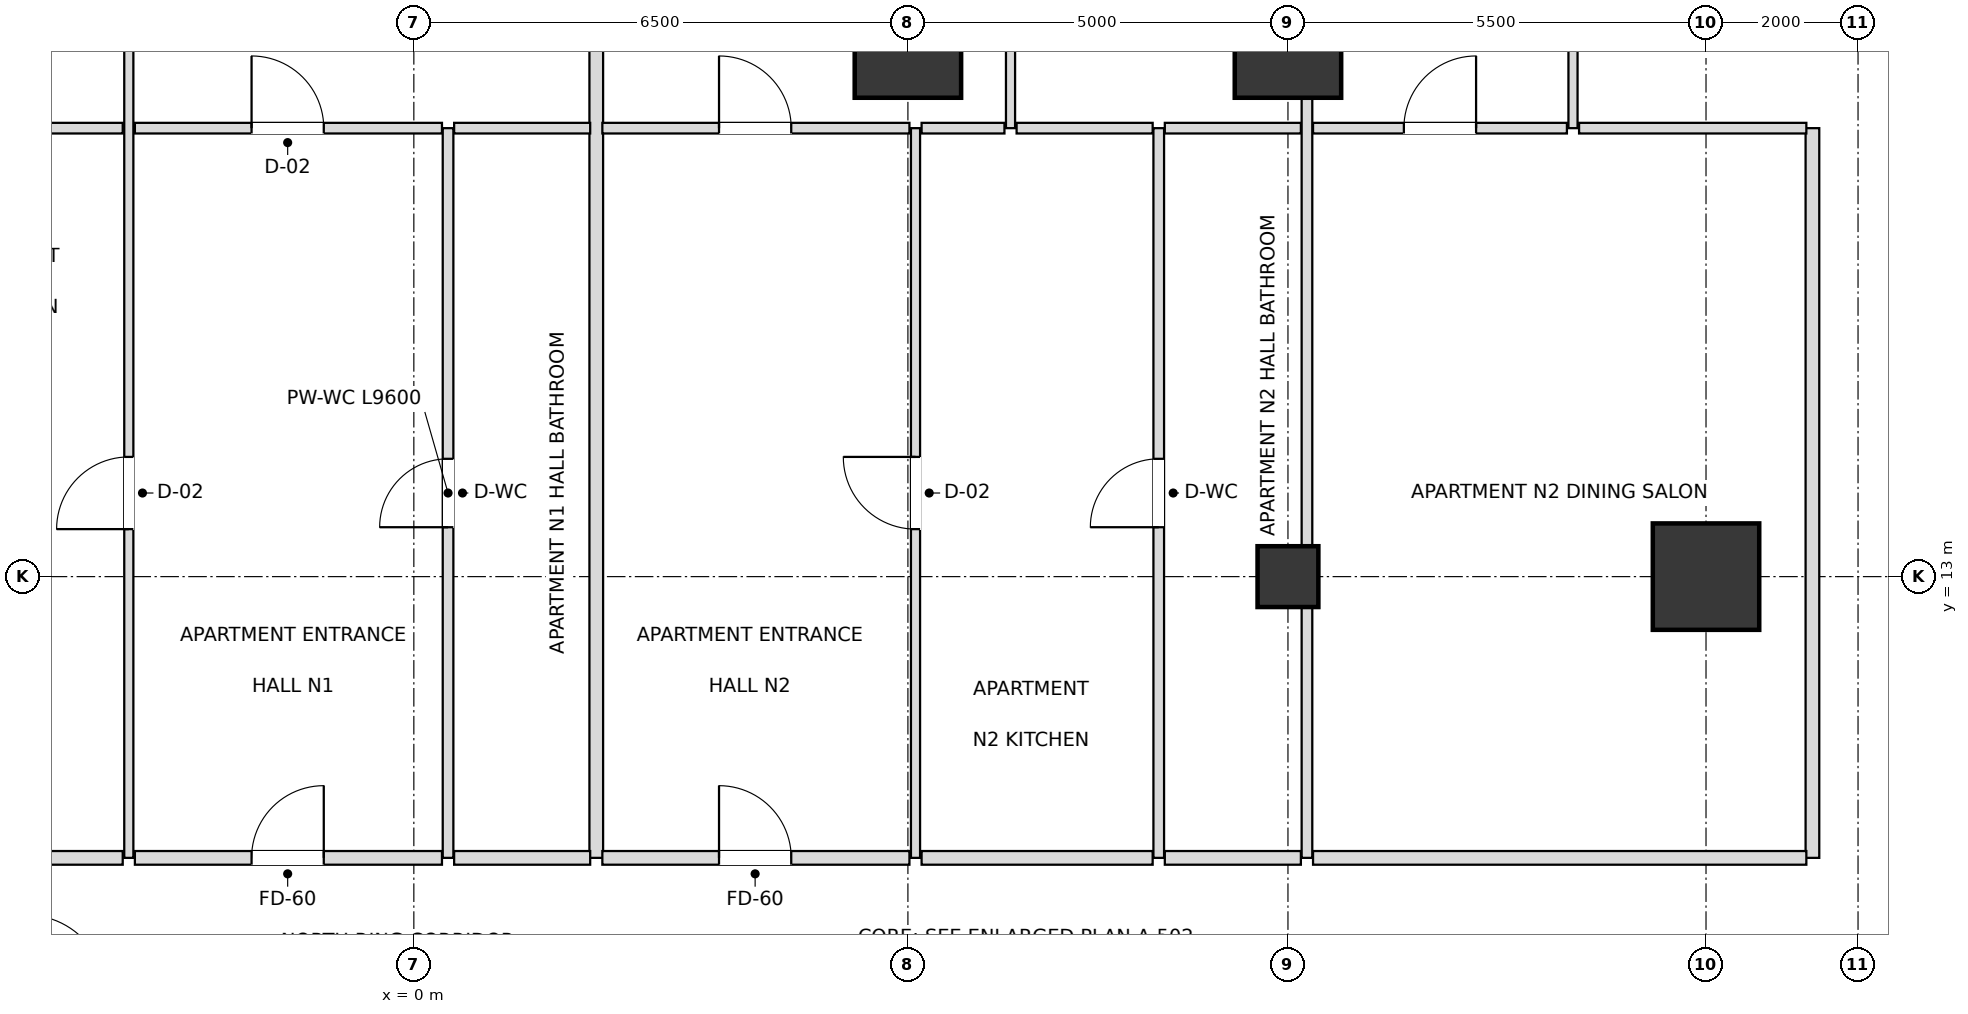
"""IFC4 building model, lengths in metres.
Left out: names, types, materials, properties, quantities, classifications, styles, units other than length and angle.
Written with IfcOpenShell. Run it as: python <this file> out.ifc"""

import sys

from ifc_helpers import new_model, si_unit, direction, frame, frame_2d, origin, origin_2d, place, context, subcontext, project, spatial, rectangle, extrude, element, fill, save


model = new_model("IFC4")
c1 = context("Model", 3, precision=1e-05, world=origin(), true_north=direction((0.0, 1.0)))
c2 = subcontext(c1, "Body", "Model", "MODEL_VIEW")
j1 = project(units=[si_unit("LENGTHUNIT", "METRE"), si_unit("PLANEANGLEUNIT", "RADIAN")], contexts=[c1])
p1 = place(None, origin())
s1 = spatial("IfcSite", under=j1, at=p1, CompositionType="ELEMENT")
p2 = place(p1, origin())
s2 = spatial("IfcBuilding", under=s1, at=p2, CompositionType="ELEMENT")
p3 = place(p2, frame((0.0, 0.0, 57.6)))
s3 = spatial("IfcBuildingStorey", under=s2, at=p3, CompositionType="ELEMENT", Elevation=57.6)
for number, where, z_axis, x_axis in (
    (1, (17.0, 13.0, 0.0), (0.0, 0.0, 1.0), (1.0, 0.0, 0.0)),
    (2, (11.5, 20.0, 0.0), (0.0, 0.0, 1.0), (1.0, 0.0, 0.0)),
    (3, (6.5, 20.0, 0.0), (0.0, 0.0, 1.0), (1.0, 0.0, 0.0)),
):
    element("IfcColumn", number, at=place(p3, frame(where, z_axis=z_axis, x_axis=x_axis)), inside=s3, PredefinedType="USERDEFINED", context=c2, shape_type="SweptSolid", body=[
        extrude(rectangle(XDim=1.4, YDim=1.4, at=origin_2d()), origin(), (0.0, 0.0, 1.0), 3.6),
    ])
p4 = place(p3, frame((11.5, 13.0, 0.0), z_axis=(0.0, 0.0, 1.0), x_axis=(1.0, 0.0, 0.0)))
e4 = element("IfcColumn", 4, at=p4, inside=s3, PredefinedType="COLUMN", context=c2, shape_type="SweptSolid", body=[
    extrude(rectangle(XDim=0.8, YDim=0.8, at=origin_2d()), origin(), (0.0, 0.0, 1.0), 3.6),
])
p5 = place(p3, frame((-3.75, 9.3, 0.0), z_axis=(0.0, 0.0, 1.0), x_axis=(0.0, 1.0, 0.0)))
e5 = element("IfcWall", 5, at=p5, inside=s3, PredefinedType="PARTITIONING", context=c2, shape_type="SweptSolid", body=[
    extrude(rectangle(XDim=15.6, YDim=0.12, at=frame_2d((7.8, 0.0))), origin(), (0.0, 0.0, 1.0), 2.816),
])
p6 = place(p5, frame((4.325, 0.0, 0.0)))
e6 = element("IfcOpeningElement", 6, at=p6, cuts=e5, PredefinedType="OPENING", context=c2, shape_type="SweptSolid", body=[
    extrude(rectangle(XDim=0.95, YDim=2.1, at=frame_2d((0.475, 1.05))), frame((0.0, 0.07, 0.0), z_axis=(0.0, -1.0, 0.0), x_axis=(1.0, 0.0, 0.0)), (0.0, 0.0, 1.0), 0.14),
])
p7 = place(p5, frame((12.15, 0.0, 0.0)))
e7 = element("IfcOpeningElement", 7, at=p7, cuts=e5, PredefinedType="OPENING", context=c2, shape_type="SweptSolid", body=[
    extrude(rectangle(XDim=0.9, YDim=2.1, at=frame_2d((0.45, 1.05))), frame((0.0, 0.07, 0.0), z_axis=(0.0, -1.0, 0.0), x_axis=(1.0, 0.0, 0.0)), (0.0, 0.0, 1.0), 0.14),
])
p8 = place(p3, frame((0.45, 9.3, 0.0), z_axis=(0.0, 0.0, 1.0), x_axis=(0.0, 1.0, 0.0)))
e8 = element("IfcWall", 8, at=p8, inside=s3, PredefinedType="PARTITIONING", context=c2, shape_type="SweptSolid", body=[
    extrude(rectangle(XDim=9.6, YDim=0.14, at=frame_2d((4.8, 0.0))), origin(), (0.0, 0.0, 1.0), 2.948),
])
p9 = place(p8, frame((4.35, 0.0, 0.0)))
e9 = element("IfcOpeningElement", 9, at=p9, cuts=e8, PredefinedType="OPENING", context=c2, shape_type="SweptSolid", body=[
    extrude(rectangle(XDim=0.9, YDim=2.1, at=frame_2d((0.45, 1.05))), frame((0.0, 0.08, 0.0), z_axis=(0.0, -1.0, 0.0), x_axis=(1.0, 0.0, 0.0)), (0.0, 0.0, 1.0), 0.16),
])
p10 = place(p3, frame((2.4, 9.3, 0.0), z_axis=(0.0, 0.0, 1.0), x_axis=(0.0, 1.0, 0.0)))
e10 = element("IfcWall", 10, at=p10, inside=s3, PredefinedType="PARTITIONING", context=c2, shape_type="SweptSolid", body=[
    extrude(rectangle(XDim=15.6, YDim=0.18, at=frame_2d((7.8, 0.0))), origin(), (0.0, 0.0, 1.0), 2.816),
])
p11 = place(p3, frame((6.6, 9.3, 0.0), z_axis=(0.0, 0.0, 1.0), x_axis=(0.0, 1.0, 0.0)))
e11 = element("IfcWall", 11, at=p11, inside=s3, PredefinedType="PARTITIONING", context=c2, shape_type="SweptSolid", body=[
    extrude(rectangle(XDim=9.6, YDim=0.12, at=frame_2d((4.8, 0.0))), origin(), (0.0, 0.0, 1.0), 2.816),
])
p12 = place(p11, frame((4.325, 0.0, 0.0)))
e12 = element("IfcOpeningElement", 12, at=p12, cuts=e11, PredefinedType="OPENING", context=c2, shape_type="SweptSolid", body=[
    extrude(rectangle(XDim=0.95, YDim=2.1, at=frame_2d((0.475, 1.05))), frame((0.0, 0.07, 0.0), z_axis=(0.0, -1.0, 0.0), x_axis=(1.0, 0.0, 0.0)), (0.0, 0.0, 1.0), 0.14),
])
p13 = place(p3, frame((7.85, 18.9, 0.0), z_axis=(0.0, 0.0, 1.0), x_axis=(0.0, 1.0, 0.0)))
e13 = element("IfcWall", 13, at=p13, inside=s3, PredefinedType="PARTITIONING", context=c2, shape_type="SweptSolid", body=[
    extrude(rectangle(XDim=6.0, YDim=0.12, at=frame_2d((3.0, 0.0))), origin(), (0.0, 0.0, 1.0), 2.816),
])
p14 = place(p13, frame((2.55, 0.0, 0.0)))
e14 = element("IfcOpeningElement", 14, at=p14, cuts=e13, PredefinedType="OPENING", context=c2, shape_type="SweptSolid", body=[
    extrude(rectangle(XDim=0.9, YDim=2.1, at=frame_2d((0.45, 1.05))), frame((0.0, 0.07, 0.0), z_axis=(0.0, -1.0, 0.0), x_axis=(1.0, 0.0, 0.0)), (0.0, 0.0, 1.0), 0.14),
])
p15 = place(p3, frame((9.8, 9.3, 0.0), z_axis=(0.0, 0.0, 1.0), x_axis=(0.0, 1.0, 0.0)))
e15 = element("IfcWall", 15, at=p15, inside=s3, PredefinedType="PARTITIONING", context=c2, shape_type="SweptSolid", body=[
    extrude(rectangle(XDim=9.6, YDim=0.14, at=frame_2d((4.8, 0.0))), origin(), (0.0, 0.0, 1.0), 2.816),
])
p16 = place(p15, frame((4.35, 0.0, 0.0)))
e16 = element("IfcOpeningElement", 16, at=p16, cuts=e15, PredefinedType="OPENING", context=c2, shape_type="SweptSolid", body=[
    extrude(rectangle(XDim=0.9, YDim=2.1, at=frame_2d((0.45, 1.05))), frame((0.0, 0.08, 0.0), z_axis=(0.0, -1.0, 0.0), x_axis=(1.0, 0.0, 0.0)), (0.0, 0.0, 1.0), 0.16),
])
p17 = place(p3, frame((11.75, 9.3, 0.0), z_axis=(0.0, 0.0, 1.0), x_axis=(0.0, 1.0, 0.0)))
e17 = element("IfcWall", 17, at=p17, inside=s3, PredefinedType="PARTITIONING", context=c2, shape_type="SweptSolid", body=[
    extrude(rectangle(XDim=15.6, YDim=0.14, at=frame_2d((7.8, 0.0))), origin(), (0.0, 0.0, 1.0), 2.736),
])
p18 = place(p17, frame((12.15, 0.0, 0.0)))
e18 = element("IfcOpeningElement", 18, at=p18, cuts=e17, PredefinedType="OPENING", context=c2, shape_type="SweptSolid", body=[
    extrude(rectangle(XDim=0.9, YDim=2.1, at=frame_2d((0.45, 1.05))), frame((0.0, 0.08, 0.0), z_axis=(0.0, -1.0, 0.0), x_axis=(1.0, 0.0, 0.0)), (0.0, 0.0, 1.0), 0.16),
])
p19 = place(p3, frame((15.25, 18.9, 0.0), z_axis=(0.0, 0.0, 1.0), x_axis=(0.0, 1.0, 0.0)))
e19 = element("IfcWall", 19, at=p19, inside=s3, PredefinedType="PARTITIONING", context=c2, shape_type="SweptSolid", body=[
    extrude(rectangle(XDim=6.0, YDim=0.12, at=frame_2d((3.0, 0.0))), origin(), (0.0, 0.0, 1.0), 2.736),
])
p20 = place(p19, frame((2.55, 0.0, 0.0)))
e20 = element("IfcOpeningElement", 20, at=p20, cuts=e19, PredefinedType="OPENING", context=c2, shape_type="SweptSolid", body=[
    extrude(rectangle(XDim=0.9, YDim=2.1, at=frame_2d((0.45, 1.05))), frame((0.0, 0.07, 0.0), z_axis=(0.0, -1.0, 0.0), x_axis=(1.0, 0.0, 0.0)), (0.0, 0.0, 1.0), 0.14),
])
p21 = place(p3, frame((18.4, 9.3, 0.0), z_axis=(0.0, 0.0, 1.0), x_axis=(0.0, 1.0, 0.0)))
e21 = element("IfcWall", 21, at=p21, inside=s3, PredefinedType="PARTITIONING", context=c2, shape_type="SweptSolid", body=[
    extrude(rectangle(XDim=9.6, YDim=0.18, at=frame_2d((4.8, 0.0))), origin(), (0.0, 0.0, 1.0), 2.736),
])
p22 = place(p3, frame((-6.87, 9.3, 0.0), z_axis=(0.0, 0.0, 1.0), x_axis=(1.0, 0.0, 0.0)))
e22 = element("IfcWall", 22, at=p22, inside=s3, PredefinedType="PARTITIONING", context=c2, shape_type="SweptSolid", body=[
    extrude(rectangle(XDim=3.04, YDim=0.18, at=frame_2d((1.52, 0.0))), origin(), (0.0, 0.0, 1.0), 2.816),
])
p23 = place(p3, frame((-3.67, 9.3, 0.0), z_axis=(0.0, 0.0, 1.0), x_axis=(1.0, 0.0, 0.0)))
e23 = element("IfcWall", 23, at=p23, inside=s3, PredefinedType="PARTITIONING", context=c2, shape_type="SweptSolid", body=[
    extrude(rectangle(XDim=4.04, YDim=0.18, at=frame_2d((2.02, 0.0))), origin(), (0.0, 0.0, 1.0), 3.38),
])
p24 = place(p23, frame((1.535, 0.0, 0.0)))
e24 = element("IfcOpeningElement", 24, at=p24, cuts=e23, PredefinedType="OPENING", context=c2, shape_type="SweptSolid", body=[
    extrude(rectangle(XDim=0.95, YDim=2.15, at=frame_2d((0.475, 1.075))), frame((0.0, 0.1, 0.0), z_axis=(0.0, -1.0, 0.0), x_axis=(1.0, 0.0, 0.0)), (0.0, 0.0, 1.0), 0.2),
])
p25 = place(p3, frame((0.53, 9.3, 0.0), z_axis=(0.0, 0.0, 1.0), x_axis=(1.0, 0.0, 0.0)))
e25 = element("IfcWall", 25, at=p25, inside=s3, PredefinedType="PARTITIONING", context=c2, shape_type="SweptSolid", body=[
    extrude(rectangle(XDim=1.79, YDim=0.18, at=frame_2d((0.895, 0.0))), origin(), (0.0, 0.0, 1.0), 3.38),
])
p26 = place(p3, frame((2.48, 9.3, 0.0), z_axis=(0.0, 0.0, 1.0), x_axis=(1.0, 0.0, 0.0)))
e26 = element("IfcWall", 26, at=p26, inside=s3, PredefinedType="PARTITIONING", context=c2, shape_type="SweptSolid", body=[
    extrude(rectangle(XDim=4.04, YDim=0.18, at=frame_2d((2.02, 0.0))), origin(), (0.0, 0.0, 1.0), 3.38),
])
p27 = place(p26, frame((1.535, 0.0, 0.0)))
e27 = element("IfcOpeningElement", 27, at=p27, cuts=e26, PredefinedType="OPENING", context=c2, shape_type="SweptSolid", body=[
    extrude(rectangle(XDim=0.95, YDim=2.15, at=frame_2d((0.475, 1.075))), frame((0.0, 0.1, 0.0), z_axis=(0.0, -1.0, 0.0), x_axis=(1.0, 0.0, 0.0)), (0.0, 0.0, 1.0), 0.2),
])
p28 = place(p3, frame((6.68, 9.3, 0.0), z_axis=(0.0, 0.0, 1.0), x_axis=(1.0, 0.0, 0.0)))
e28 = element("IfcWall", 28, at=p28, inside=s3, PredefinedType="PARTITIONING", context=c2, shape_type="SweptSolid", body=[
    extrude(rectangle(XDim=3.04, YDim=0.18, at=frame_2d((1.52, 0.0))), origin(), (0.0, 0.0, 1.0), 3.38),
])
p29 = place(p3, frame((9.88, 9.3, 0.0), z_axis=(0.0, 0.0, 1.0), x_axis=(1.0, 0.0, 0.0)))
e29 = element("IfcWall", 29, at=p29, inside=s3, PredefinedType="PARTITIONING", context=c2, shape_type="SweptSolid", body=[
    extrude(rectangle(XDim=1.79, YDim=0.18, at=frame_2d((0.895, 0.0))), origin(), (0.0, 0.0, 1.0), 3.38),
])
p30 = place(p3, frame((11.83, 9.3, 0.0), z_axis=(0.0, 0.0, 1.0), x_axis=(1.0, 0.0, 0.0)))
e30 = element("IfcWall", 30, at=p30, inside=s3, PredefinedType="PARTITIONING", context=c2, shape_type="SweptSolid", body=[
    extrude(rectangle(XDim=6.49, YDim=0.18, at=frame_2d((3.245, 0.0))), origin(), (0.0, 0.0, 1.0), 2.816),
])
p31 = place(p3, frame((-6.87, 18.9, 0.0), z_axis=(0.0, 0.0, 1.0), x_axis=(1.0, 0.0, 0.0)))
e31 = element("IfcWall", 31, at=p31, inside=s3, PredefinedType="PARTITIONING", context=c2, shape_type="SweptSolid", body=[
    extrude(rectangle(XDim=3.04, YDim=0.14, at=frame_2d((1.52, 0.0))), origin(), (0.0, 0.0, 1.0), 2.816),
])
p32 = place(p3, frame((-3.67, 18.9, 0.0), z_axis=(0.0, 0.0, 1.0), x_axis=(1.0, 0.0, 0.0)))
e32 = element("IfcWall", 32, at=p32, inside=s3, PredefinedType="PARTITIONING", context=c2, shape_type="SweptSolid", body=[
    extrude(rectangle(XDim=4.04, YDim=0.14, at=frame_2d((2.02, 0.0))), origin(), (0.0, 0.0, 1.0), 3.38),
])
p33 = place(p32, frame((1.535, 0.0, 0.0)))
e33 = element("IfcOpeningElement", 33, at=p33, cuts=e32, PredefinedType="OPENING", context=c2, shape_type="SweptSolid", body=[
    extrude(rectangle(XDim=0.95, YDim=2.1, at=frame_2d((0.475, 1.05))), frame((0.0, 0.08, 0.0), z_axis=(0.0, -1.0, 0.0), x_axis=(1.0, 0.0, 0.0)), (0.0, 0.0, 1.0), 0.16),
])
p34 = place(p3, frame((0.53, 18.9, 0.0), z_axis=(0.0, 0.0, 1.0), x_axis=(1.0, 0.0, 0.0)))
e34 = element("IfcWall", 34, at=p34, inside=s3, PredefinedType="PARTITIONING", context=c2, shape_type="SweptSolid", body=[
    extrude(rectangle(XDim=1.79, YDim=0.14, at=frame_2d((0.895, 0.0))), origin(), (0.0, 0.0, 1.0), 3.38),
])
p35 = place(p3, frame((2.48, 18.9, 0.0), z_axis=(0.0, 0.0, 1.0), x_axis=(1.0, 0.0, 0.0)))
e35 = element("IfcWall", 35, at=p35, inside=s3, PredefinedType="PARTITIONING", context=c2, shape_type="SweptSolid", body=[
    extrude(rectangle(XDim=4.04, YDim=0.14, at=frame_2d((2.02, 0.0))), origin(), (0.0, 0.0, 1.0), 3.38),
])
p36 = place(p35, frame((1.535, 0.0, 0.0)))
e36 = element("IfcOpeningElement", 36, at=p36, cuts=e35, PredefinedType="OPENING", context=c2, shape_type="SweptSolid", body=[
    extrude(rectangle(XDim=0.95, YDim=2.1, at=frame_2d((0.475, 1.05))), frame((0.0, 0.08, 0.0), z_axis=(0.0, -1.0, 0.0), x_axis=(1.0, 0.0, 0.0)), (0.0, 0.0, 1.0), 0.16),
])
p37 = place(p3, frame((6.68, 18.9, 0.0), z_axis=(0.0, 0.0, 1.0), x_axis=(1.0, 0.0, 0.0)))
e37 = element("IfcWall", 37, at=p37, inside=s3, PredefinedType="PARTITIONING", context=c2, shape_type="SweptSolid", body=[
    extrude(rectangle(XDim=1.09, YDim=0.14, at=frame_2d((0.545, 0.0))), origin(), (0.0, 0.0, 1.0), 3.38),
])
p38 = place(p3, frame((7.93, 18.9, 0.0), z_axis=(0.0, 0.0, 1.0), x_axis=(1.0, 0.0, 0.0)))
e38 = element("IfcWall", 38, at=p38, inside=s3, PredefinedType="PARTITIONING", context=c2, shape_type="SweptSolid", body=[
    extrude(rectangle(XDim=1.79, YDim=0.14, at=frame_2d((0.895, 0.0))), origin(), (0.0, 0.0, 1.0), 3.38),
])
p39 = place(p3, frame((9.88, 18.9, 0.0), z_axis=(0.0, 0.0, 1.0), x_axis=(1.0, 0.0, 0.0)))
e39 = element("IfcWall", 39, at=p39, inside=s3, PredefinedType="PARTITIONING", context=c2, shape_type="SweptSolid", body=[
    extrude(rectangle(XDim=1.79, YDim=0.14, at=frame_2d((0.895, 0.0))), origin(), (0.0, 0.0, 1.0), 2.736),
])
p40 = place(p3, frame((11.83, 18.9, 0.0), z_axis=(0.0, 0.0, 1.0), x_axis=(1.0, 0.0, 0.0)))
e40 = element("IfcWall", 40, at=p40, inside=s3, PredefinedType="PARTITIONING", context=c2, shape_type="SweptSolid", body=[
    extrude(rectangle(XDim=3.34, YDim=0.14, at=frame_2d((1.67, 0.0))), origin(), (0.0, 0.0, 1.0), 2.736),
])
p41 = place(p40, frame((1.195, 0.0, 0.0)))
e41 = element("IfcOpeningElement", 41, at=p41, cuts=e40, PredefinedType="OPENING", context=c2, shape_type="SweptSolid", body=[
    extrude(rectangle(XDim=0.95, YDim=2.1, at=frame_2d((0.475, 1.05))), frame((0.0, 0.08, 0.0), z_axis=(0.0, -1.0, 0.0), x_axis=(1.0, 0.0, 0.0)), (0.0, 0.0, 1.0), 0.16),
])
p42 = place(p3, frame((15.33, 18.9, 0.0), z_axis=(0.0, 0.0, 1.0), x_axis=(1.0, 0.0, 0.0)))
e42 = element("IfcWall", 42, at=p42, inside=s3, PredefinedType="PARTITIONING", context=c2, shape_type="SweptSolid", body=[
    extrude(rectangle(XDim=2.99, YDim=0.14, at=frame_2d((1.495, 0.0))), origin(), (0.0, 0.0, 1.0), 2.736),
])
p43 = place(p9, origin())
e43 = element("IfcDoor", 43, at=p43, inside=s3, OperationType="SINGLE_SWING_LEFT", PredefinedType="DOOR", context=c2, shape_type="SweptSolid", body=[
    extrude(rectangle(XDim=0.9, YDim=2.1, at=frame_2d((0.45, 1.05))), frame((0.0, 0.025, 0.0), z_axis=(0.0, -1.0, 0.0), x_axis=(1.0, 0.0, 0.0)), (0.0, 0.0, 1.0), 0.05),
])
fill(e9, e43)
p44 = place(p24, origin())
e44 = element("IfcDoor", 44, at=p44, inside=s3, OperationType="SINGLE_SWING_RIGHT", PredefinedType="DOOR", context=c2, shape_type="SweptSolid", body=[
    extrude(rectangle(XDim=0.95, YDim=2.15, at=frame_2d((0.475, 1.075))), frame((0.0, 0.025, 0.0), z_axis=(0.0, -1.0, 0.0), x_axis=(1.0, 0.0, 0.0)), (0.0, 0.0, 1.0), 0.05),
])
fill(e24, e44)
p45 = place(p6, origin())
e45 = element("IfcDoor", 45, at=p45, inside=s3, OperationType="SINGLE_SWING_LEFT", PredefinedType="DOOR", context=c2, shape_type="SweptSolid", body=[
    extrude(rectangle(XDim=0.95, YDim=2.1, at=frame_2d((0.475, 1.05))), frame((0.0, 0.025, 0.0), z_axis=(0.0, -1.0, 0.0), x_axis=(1.0, 0.0, 0.0)), (0.0, 0.0, 1.0), 0.05),
])
fill(e6, e45)
p46 = place(p33, origin())
e46 = element("IfcDoor", 46, at=p46, inside=s3, OperationType="SINGLE_SWING_LEFT", PredefinedType="DOOR", context=c2, shape_type="SweptSolid", body=[
    extrude(rectangle(XDim=0.95, YDim=2.1, at=frame_2d((0.475, 1.05))), frame((0.0, 0.025, 0.0), z_axis=(0.0, -1.0, 0.0), x_axis=(1.0, 0.0, 0.0)), (0.0, 0.0, 1.0), 0.05),
])
fill(e33, e46)
p47 = place(p27, origin())
e47 = element("IfcDoor", 47, at=p47, inside=s3, OperationType="SINGLE_SWING_LEFT", PredefinedType="DOOR", context=c2, shape_type="SweptSolid", body=[
    extrude(rectangle(XDim=0.95, YDim=2.15, at=frame_2d((0.475, 1.075))), frame((0.0, 0.025, 0.0), z_axis=(0.0, -1.0, 0.0), x_axis=(1.0, 0.0, 0.0)), (0.0, 0.0, 1.0), 0.05),
])
fill(e27, e47)
p48 = place(p12, origin())
e48 = element("IfcDoor", 48, at=p48, inside=s3, OperationType="SINGLE_SWING_RIGHT", PredefinedType="DOOR", context=c2, shape_type="SweptSolid", body=[
    extrude(rectangle(XDim=0.95, YDim=2.1, at=frame_2d((0.475, 1.05))), frame((0.0, 0.025, 0.0), z_axis=(0.0, -1.0, 0.0), x_axis=(1.0, 0.0, 0.0)), (0.0, 0.0, 1.0), 0.05),
])
fill(e12, e48)
p49 = place(p16, origin())
e49 = element("IfcDoor", 49, at=p49, inside=s3, OperationType="SINGLE_SWING_LEFT", PredefinedType="DOOR", context=c2, shape_type="SweptSolid", body=[
    extrude(rectangle(XDim=0.9, YDim=2.1, at=frame_2d((0.45, 1.05))), frame((0.0, 0.025, 0.0), z_axis=(0.0, -1.0, 0.0), x_axis=(1.0, 0.0, 0.0)), (0.0, 0.0, 1.0), 0.05),
])
fill(e16, e49)
p50 = place(p41, origin())
e50 = element("IfcDoor", 50, at=p50, inside=s3, OperationType="SINGLE_SWING_RIGHT", PredefinedType="DOOR", context=c2, shape_type="SweptSolid", body=[
    extrude(rectangle(XDim=0.95, YDim=2.1, at=frame_2d((0.475, 1.05))), frame((0.0, 0.025, 0.0), z_axis=(0.0, -1.0, 0.0), x_axis=(1.0, 0.0, 0.0)), (0.0, 0.0, 1.0), 0.05),
])
fill(e41, e50)
p51 = place(p36, origin())
e51 = element("IfcDoor", 51, at=p51, inside=s3, OperationType="SINGLE_SWING_LEFT", PredefinedType="DOOR", context=c2, shape_type="SweptSolid", body=[
    extrude(rectangle(XDim=0.95, YDim=2.1, at=frame_2d((0.475, 1.05))), frame((0.0, 0.025, 0.0), z_axis=(0.0, -1.0, 0.0), x_axis=(1.0, 0.0, 0.0)), (0.0, 0.0, 1.0), 0.05),
])
fill(e36, e51)
save(model, sys.argv[1])
